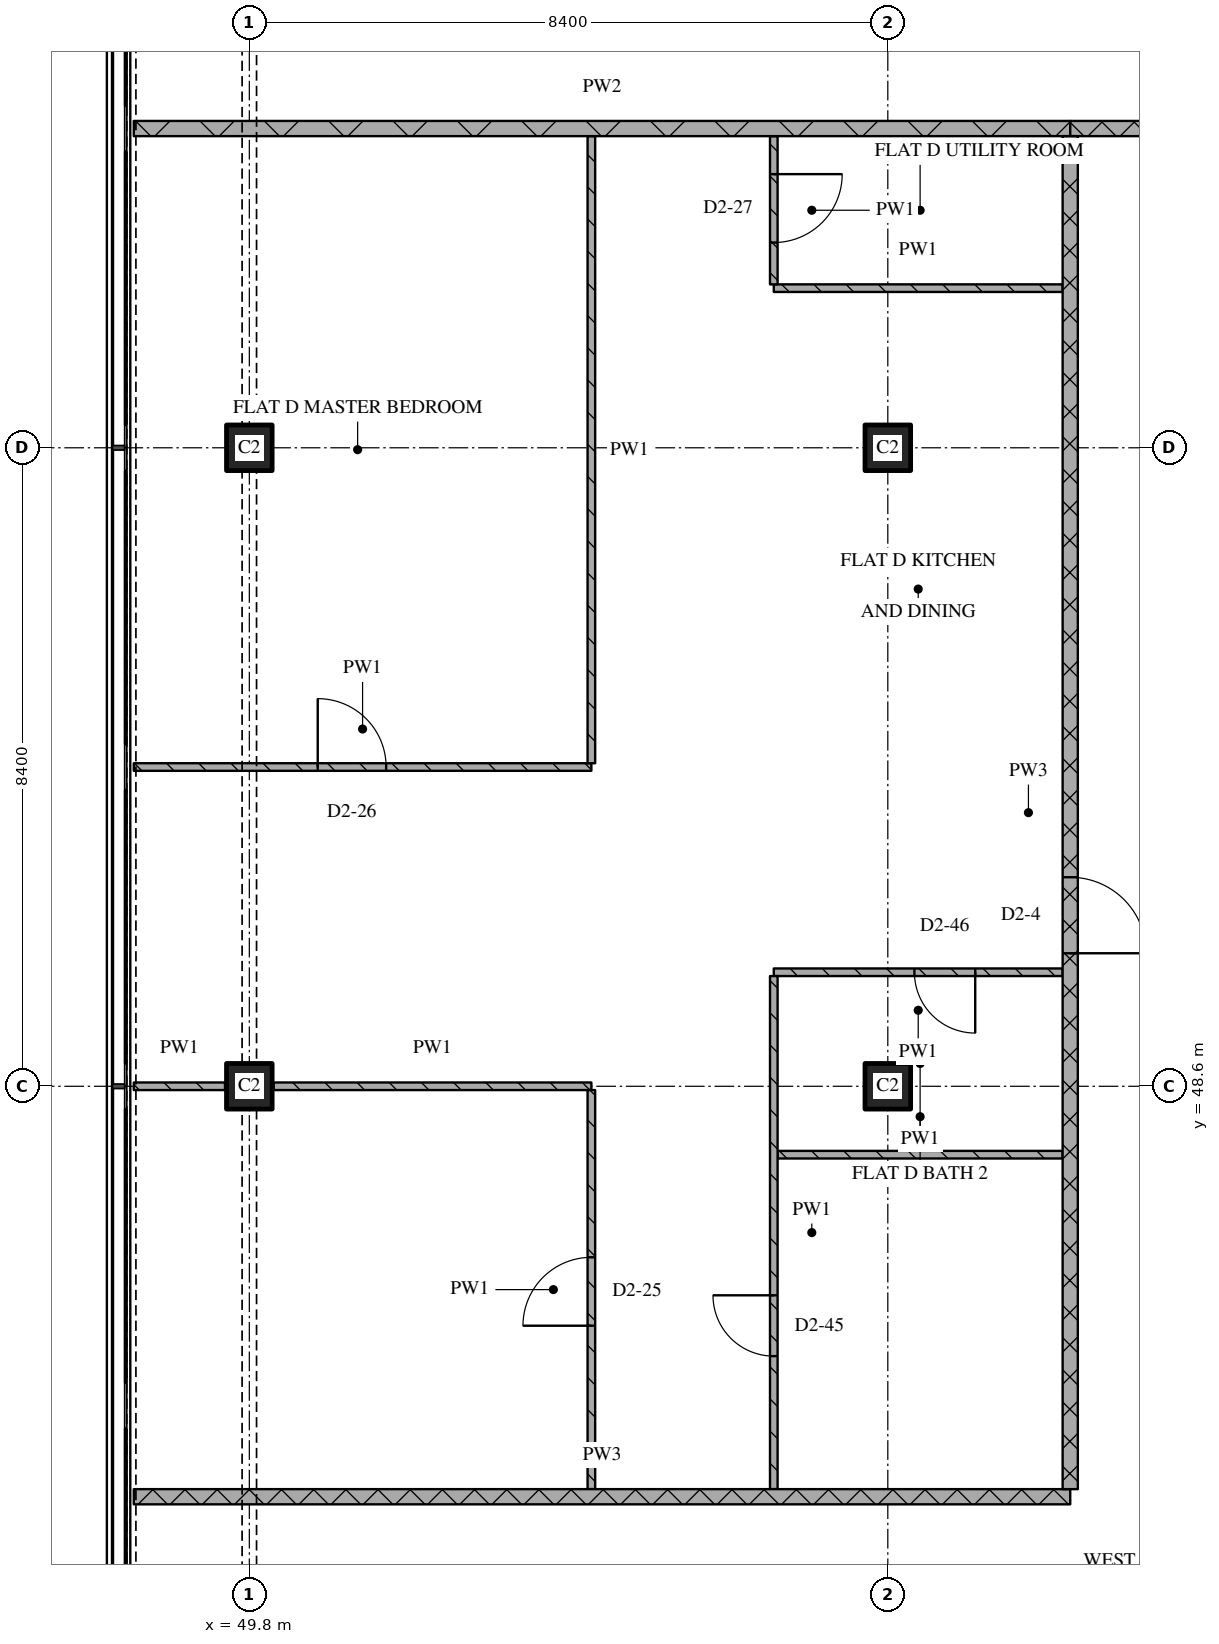
"""IFC4 building model, lengths in metres.
Left out: names, types, materials, properties, quantities, classifications, styles, units other than length and angle.
Written with IfcOpenShell. Run it as: python <this file> out.ifc"""

import sys

from ifc_helpers import new_model, si_unit, direction, frame, frame_2d, origin, origin_2d, place, context, subcontext, project, spatial, rectangle, extrude, element, fill, save


model = new_model("IFC4")
c1 = context("Model", 3, precision=1e-05, world=origin(), true_north=direction((0.0, 1.0)))
c2 = subcontext(c1, "Body", "Model", "MODEL_VIEW")
j1 = project(units=[si_unit("LENGTHUNIT", "METRE"), si_unit("PLANEANGLEUNIT", "RADIAN")], contexts=[c1])
p1 = place(None, origin())
s1 = spatial("IfcSite", under=j1, at=p1, CompositionType="ELEMENT")
p2 = place(p1, origin())
s2 = spatial("IfcBuilding", under=s1, at=p2, CompositionType="ELEMENT")
p3 = place(p2, frame((0.0, 0.0, 223.5)))
s3 = spatial("IfcBuildingStorey", under=s2, at=p3, CompositionType="ELEMENT", Elevation=223.5)
for number, where, z_axis, x_axis in (
    (1, (49.8, 48.6, 0.0), (0.0, 0.0, 1.0), (1.0, 0.0, 0.0)),
    (2, (49.8, 57.0, 0.0), (0.0, 0.0, 1.0), (1.0, 0.0, 0.0)),
    (3, (58.2, 48.6, 0.0), (0.0, 0.0, 1.0), (1.0, 0.0, 0.0)),
    (4, (58.2, 57.0, 0.0), (0.0, 0.0, 1.0), (1.0, 0.0, 0.0)),
):
    element("IfcColumn", number, at=place(p3, frame(where, z_axis=z_axis, x_axis=x_axis)), inside=s3, PredefinedType="COLUMN", context=c2, shape_type="SweptSolid", body=[
        extrude(rectangle(XDim=0.6, YDim=0.6, at=origin_2d()), origin(), (0.0, 0.0, 1.0), 3.6),
    ])
p4 = place(p3, frame((48.28, 43.2, 0.0), z_axis=(0.0, 0.0, 1.0), x_axis=(1.0, 0.0, 0.0)))
e5 = element("IfcWall", 5, at=p4, inside=s3, PredefinedType="PARTITIONING", context=c2, shape_type="SweptSolid", body=[
    extrude(rectangle(XDim=12.32, YDim=0.2, at=frame_2d((6.16, 0.0))), origin(), (0.0, 0.0, 1.0), 3.32),
])
p5 = place(p3, frame((56.75, 47.7, 0.0), z_axis=(0.0, 0.0, 1.0), x_axis=(1.0, 0.0, 0.0)))
e6 = element("IfcWall", 6, at=p5, inside=s3, PredefinedType="PARTITIONING", context=c2, shape_type="SweptSolid", body=[
    extrude(rectangle(XDim=3.75, YDim=0.1, at=frame_2d((1.875, 0.0))), origin(), (0.0, 0.0, 1.0), 3.32),
])
p6 = place(p3, frame((48.28, 48.6, 0.0), z_axis=(0.0, 0.0, 1.0), x_axis=(1.0, 0.0, 0.0)))
e7 = element("IfcWall", 7, at=p6, inside=s3, PredefinedType="PARTITIONING", context=c2, shape_type="SweptSolid", body=[
    extrude(rectangle(XDim=1.2, YDim=0.1, at=frame_2d((0.6, 0.0))), origin(), (0.0, 0.0, 1.0), 3.32),
])
p7 = place(p3, frame((50.12, 48.6, 0.0), z_axis=(0.0, 0.0, 1.0), x_axis=(1.0, 0.0, 0.0)))
e8 = element("IfcWall", 8, at=p7, inside=s3, PredefinedType="PARTITIONING", context=c2, shape_type="SweptSolid", body=[
    extrude(rectangle(XDim=4.18, YDim=0.1, at=frame_2d((2.09, 0.0))), origin(), (0.0, 0.0, 1.0), 3.32),
])
p8 = place(p3, frame((60.5, 50.1, 0.0), z_axis=(0.0, 0.0, 1.0), x_axis=(-1.0, 0.0, 0.0)))
e9 = element("IfcWall", 9, at=p8, inside=s3, PredefinedType="PARTITIONING", context=c2, shape_type="SweptSolid", body=[
    extrude(rectangle(XDim=3.8, YDim=0.1, at=frame_2d((1.9, 0.0))), origin(), (0.0, 0.0, 1.0), 3.32),
])
p9 = place(p8, frame((1.15, 0.0, 0.0)))
e10 = element("IfcOpeningElement", 10, at=p9, cuts=e9, PredefinedType="OPENING", context=c2, shape_type="SweptSolid", body=[
    extrude(rectangle(XDim=0.8, YDim=2.1, at=frame_2d((0.4, 1.05))), frame((0.0, 0.06, 0.0), z_axis=(0.0, -1.0, 0.0), x_axis=(1.0, 0.0, 0.0)), (0.0, 0.0, 1.0), 0.12),
])
p10 = place(p3, frame((48.28, 52.8, 0.0), z_axis=(0.0, 0.0, 1.0), x_axis=(1.0, 0.0, 0.0)))
e11 = element("IfcWall", 11, at=p10, inside=s3, PredefinedType="PARTITIONING", context=c2, shape_type="SweptSolid", body=[
    extrude(rectangle(XDim=6.02, YDim=0.1, at=frame_2d((3.01, 0.0))), origin(), (0.0, 0.0, 1.0), 3.32),
])
p11 = place(p10, frame((2.42, 0.0, 0.0)))
e12 = element("IfcOpeningElement", 12, at=p11, cuts=e11, PredefinedType="OPENING", context=c2, shape_type="SweptSolid", body=[
    extrude(rectangle(XDim=0.9, YDim=2.1, at=frame_2d((0.45, 1.05))), frame((0.0, 0.06, 0.0), z_axis=(0.0, -1.0, 0.0), x_axis=(1.0, 0.0, 0.0)), (0.0, 0.0, 1.0), 0.12),
])
p12 = place(p3, frame((56.7, 59.1, 0.0), z_axis=(0.0, 0.0, 1.0), x_axis=(1.0, 0.0, 0.0)))
e13 = element("IfcWall", 13, at=p12, inside=s3, PredefinedType="PARTITIONING", context=c2, shape_type="SweptSolid", body=[
    extrude(rectangle(XDim=3.8, YDim=0.1, at=frame_2d((1.9, 0.0))), origin(), (0.0, 0.0, 1.0), 3.32),
])
p13 = place(p3, frame((60.6, 61.2, 0.0), z_axis=(0.0, 0.0, 1.0), x_axis=(1.0, 0.0, 0.0)))
e14 = element("IfcWall", 14, at=p13, inside=s3, PredefinedType="PARTITIONING", context=c2, shape_type="SweptSolid", body=[
    extrude(rectangle(XDim=3.6, YDim=0.2, at=frame_2d((1.8, 0.0))), origin(), (0.0, 0.0, 1.0), 3.32),
])
p14 = place(p3, frame((48.28, 61.2, 0.0), z_axis=(0.0, 0.0, 1.0), x_axis=(1.0, 0.0, 0.0)))
e15 = element("IfcWall", 15, at=p14, inside=s3, PredefinedType="PARTITIONING", context=c2, shape_type="SweptSolid", body=[
    extrude(rectangle(XDim=12.32, YDim=0.2, at=frame_2d((6.16, 0.0))), origin(), (0.0, 0.0, 1.0), 3.32),
])
p15 = place(p3, frame((54.3, 43.3, 0.0), z_axis=(0.0, 0.0, 1.0), x_axis=(0.0, 1.0, 0.0)))
e16 = element("IfcWall", 16, at=p15, inside=s3, PredefinedType="PARTITIONING", context=c2, shape_type="SweptSolid", body=[
    extrude(rectangle(XDim=5.25, YDim=0.1, at=frame_2d((2.625, 0.0))), origin(), (0.0, 0.0, 1.0), 3.32),
])
p16 = place(p15, frame((2.15, 0.0, 0.0)))
e17 = element("IfcOpeningElement", 17, at=p16, cuts=e16, PredefinedType="OPENING", context=c2, shape_type="SweptSolid", body=[
    extrude(rectangle(XDim=0.9, YDim=2.1, at=frame_2d((0.45, 1.05))), frame((0.0, 0.06, 0.0), z_axis=(0.0, -1.0, 0.0), x_axis=(1.0, 0.0, 0.0)), (0.0, 0.0, 1.0), 0.12),
])
p17 = place(p3, frame((54.3, 61.1, 0.0), z_axis=(0.0, 0.0, 1.0), x_axis=(0.0, -1.0, 0.0)))
e18 = element("IfcWall", 18, at=p17, inside=s3, PredefinedType="PARTITIONING", context=c2, shape_type="SweptSolid", body=[
    extrude(rectangle(XDim=8.25, YDim=0.1, at=frame_2d((4.125, 0.0))), origin(), (0.0, 0.0, 1.0), 3.32),
])
p18 = place(p3, frame((56.7, 50.05, 0.0), z_axis=(0.0, 0.0, 1.0), x_axis=(0.0, -1.0, 0.0)))
e19 = element("IfcWall", 19, at=p18, inside=s3, PredefinedType="PARTITIONING", context=c2, shape_type="SweptSolid", body=[
    extrude(rectangle(XDim=6.75, YDim=0.1, at=frame_2d((3.375, 0.0))), origin(), (0.0, 0.0, 1.0), 3.32),
])
p19 = place(p18, frame((4.2, 0.0, 0.0)))
e20 = element("IfcOpeningElement", 20, at=p19, cuts=e19, PredefinedType="OPENING", context=c2, shape_type="SweptSolid", body=[
    extrude(rectangle(XDim=0.8, YDim=2.1, at=frame_2d((0.4, 1.05))), frame((0.0, 0.06, 0.0), z_axis=(0.0, -1.0, 0.0), x_axis=(1.0, 0.0, 0.0)), (0.0, 0.0, 1.0), 0.12),
])
p20 = place(p3, frame((56.7, 61.1, 0.0), z_axis=(0.0, 0.0, 1.0), x_axis=(0.0, -1.0, 0.0)))
e21 = element("IfcWall", 21, at=p20, inside=s3, PredefinedType="PARTITIONING", context=c2, shape_type="SweptSolid", body=[
    extrude(rectangle(XDim=1.95, YDim=0.1, at=frame_2d((0.975, 0.0))), origin(), (0.0, 0.0, 1.0), 3.32),
])
p21 = place(p20, frame((0.5, 0.0, 0.0)))
e22 = element("IfcOpeningElement", 22, at=p21, cuts=e21, PredefinedType="OPENING", context=c2, shape_type="SweptSolid", body=[
    extrude(rectangle(XDim=0.9, YDim=2.1, at=frame_2d((0.45, 1.05))), frame((0.0, 0.06, 0.0), z_axis=(0.0, -1.0, 0.0), x_axis=(1.0, 0.0, 0.0)), (0.0, 0.0, 1.0), 0.12),
])
p22 = place(p3, frame((60.6, 43.3, 0.0), z_axis=(0.0, 0.0, 1.0), x_axis=(0.0, 1.0, 0.0)))
e23 = element("IfcWall", 23, at=p22, inside=s3, PredefinedType="PARTITIONING", context=c2, shape_type="SweptSolid", body=[
    extrude(rectangle(XDim=17.8, YDim=0.2, at=frame_2d((8.9, 0.0))), origin(), (0.0, 0.0, 1.0), 3.32),
])
p23 = place(p22, frame((7.05, 0.0, 0.0)))
e24 = element("IfcOpeningElement", 24, at=p23, cuts=e23, PredefinedType="OPENING", context=c2, shape_type="SweptSolid", body=[
    extrude(rectangle(XDim=1.0, YDim=2.1, at=frame_2d((0.5, 1.05))), frame((0.0, 0.11, 0.0), z_axis=(0.0, -1.0, 0.0), x_axis=(1.0, 0.0, 0.0)), (0.0, 0.0, 1.0), 0.22),
])
p24 = place(p9, origin())
e25 = element("IfcDoor", 25, at=p24, inside=s3, OperationType="SINGLE_SWING_LEFT", PredefinedType="DOOR", context=c2, shape_type="SweptSolid", body=[
    extrude(rectangle(XDim=0.8, YDim=2.1, at=frame_2d((0.4, 1.05))), frame((0.0, 0.025, 0.0), z_axis=(0.0, -1.0, 0.0), x_axis=(1.0, 0.0, 0.0)), (0.0, 0.0, 1.0), 0.05),
])
fill(e10, e25)
p25 = place(p11, origin())
e26 = element("IfcDoor", 26, at=p25, inside=s3, OperationType="SINGLE_SWING_LEFT", PredefinedType="DOOR", context=c2, shape_type="SweptSolid", body=[
    extrude(rectangle(XDim=0.9, YDim=2.1, at=frame_2d((0.45, 1.05))), frame((0.0, 0.025, 0.0), z_axis=(0.0, -1.0, 0.0), x_axis=(1.0, 0.0, 0.0)), (0.0, 0.0, 1.0), 0.05),
])
fill(e12, e26)
p26 = place(p16, origin())
e27 = element("IfcDoor", 27, at=p26, inside=s3, OperationType="SINGLE_SWING_LEFT", PredefinedType="DOOR", context=c2, shape_type="SweptSolid", body=[
    extrude(rectangle(XDim=0.9, YDim=2.1, at=frame_2d((0.45, 1.05))), frame((0.0, 0.025, 0.0), z_axis=(0.0, -1.0, 0.0), x_axis=(1.0, 0.0, 0.0)), (0.0, 0.0, 1.0), 0.05),
])
fill(e17, e27)
p27 = place(p19, origin())
e28 = element("IfcDoor", 28, at=p27, inside=s3, OperationType="SINGLE_SWING_RIGHT", PredefinedType="DOOR", context=c2, shape_type="SweptSolid", body=[
    extrude(rectangle(XDim=0.8, YDim=2.1, at=frame_2d((0.4, 1.05))), frame((0.0, 0.025, 0.0), z_axis=(0.0, -1.0, 0.0), x_axis=(1.0, 0.0, 0.0)), (0.0, 0.0, 1.0), 0.05),
])
fill(e20, e28)
p28 = place(p21, origin())
e29 = element("IfcDoor", 29, at=p28, inside=s3, OperationType="SINGLE_SWING_LEFT", PredefinedType="DOOR", context=c2, shape_type="SweptSolid", body=[
    extrude(rectangle(XDim=0.9, YDim=2.1, at=frame_2d((0.45, 1.05))), frame((0.0, 0.025, 0.0), z_axis=(0.0, -1.0, 0.0), x_axis=(1.0, 0.0, 0.0)), (0.0, 0.0, 1.0), 0.05),
])
fill(e22, e29)
p29 = place(p23, origin())
e30 = element("IfcDoor", 30, at=p29, inside=s3, OperationType="SINGLE_SWING_RIGHT", PredefinedType="DOOR", context=c2, shape_type="SweptSolid", body=[
    extrude(rectangle(XDim=1.0, YDim=2.1, at=frame_2d((0.5, 1.05))), frame((0.0, 0.025, 0.0), z_axis=(0.0, -1.0, 0.0), x_axis=(1.0, 0.0, 0.0)), (0.0, 0.0, 1.0), 0.05),
])
fill(e24, e30)
save(model, sys.argv[1])
